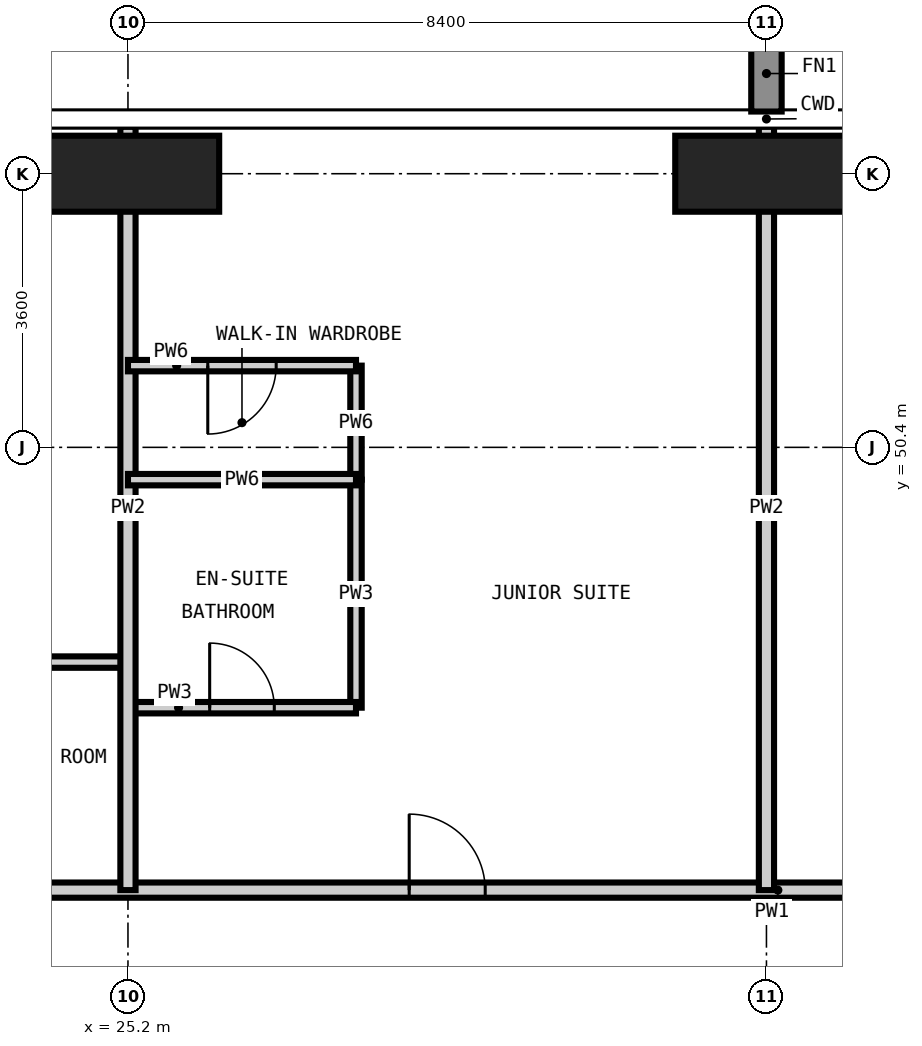
"""IFC4 building model, lengths in metres.
Left out: names, types, materials, properties, quantities, classifications, styles, units other than length and angle.
Written with IfcOpenShell. Run it as: python <this file> out.ifc"""

import sys

from ifc_helpers import new_model, si_unit, direction, frame, frame_2d, origin, origin_2d, place, context, subcontext, project, spatial, rectangle, extrude, element, fill, save


model = new_model("IFC4")
c1 = context("Model", 3, precision=1e-05, world=origin(), true_north=direction((0.0, 1.0)))
c2 = subcontext(c1, "Body", "Model", "MODEL_VIEW")
j1 = project(units=[si_unit("LENGTHUNIT", "METRE"), si_unit("PLANEANGLEUNIT", "RADIAN")], contexts=[c1])
p1 = place(None, origin())
s1 = spatial("IfcSite", under=j1, at=p1, CompositionType="ELEMENT")
p2 = place(p1, origin())
s2 = spatial("IfcBuilding", under=s1, at=p2, CompositionType="ELEMENT")
p3 = place(p2, frame((0.0, 0.0, 237.3)))
s3 = spatial("IfcBuildingStorey", under=s2, at=p3, CompositionType="ELEMENT", Elevation=237.3)
for number, where, z_axis, x_axis in (
    (1, (25.2, 54.0, -0.35), (0.0, 0.0, 1.0), (1.0, 0.0, 0.0)),
    (2, (33.6, 54.0, -0.35), (0.0, 0.0, 1.0), (1.0, 0.0, 0.0)),
):
    element("IfcColumn", number, at=place(p3, frame(where, z_axis=z_axis, x_axis=x_axis)), inside=s3, PredefinedType="COLUMN", context=c2, shape_type="SweptSolid", body=[
        extrude(rectangle(XDim=2.4, YDim=1.0, at=origin_2d()), origin(), (0.0, 0.0, 1.0), 3.9),
    ])
p4 = place(p3, frame((28.2, 46.975, 0.0), z_axis=(0.0, 0.0, 1.0), x_axis=(0.0, 1.0, 0.0)))
e3 = element("IfcWall", 3, at=p4, inside=s3, PredefinedType="PARTITIONING", context=c2, shape_type="SweptSolid", body=[
    extrude(rectangle(XDim=3.0, YDim=0.15, at=frame_2d((1.5, 0.0))), origin(), (0.0, 0.0, 1.0), 3.55),
])
p5 = place(p3, frame((25.2, 46.975, 0.0), z_axis=(0.0, 0.0, 1.0), x_axis=(1.0, 0.0, 0.0)))
e4 = element("IfcWall", 4, at=p5, inside=s3, PredefinedType="PARTITIONING", context=c2, shape_type="SweptSolid", body=[
    extrude(rectangle(XDim=3.0, YDim=0.15, at=frame_2d((1.5, 0.0))), origin(), (0.0, 0.0, 1.0), 3.55),
])
p6 = place(p5, frame((1.075, 0.0, 0.0)))
e5 = element("IfcOpeningElement", 5, at=p6, cuts=e4, PredefinedType="OPENING", context=c2, shape_type="SweptSolid", body=[
    extrude(rectangle(XDim=0.85, YDim=2.1, at=frame_2d((0.425, 1.05))), frame((0.0, 0.085, 0.0), z_axis=(0.0, -1.0, 0.0), x_axis=(1.0, 0.0, 0.0)), (0.0, 0.0, 1.0), 0.17),
])
p7 = place(p3, frame((22.325, 47.575, 0.0), z_axis=(0.0, 0.0, 1.0), x_axis=(1.0, 0.0, 0.0)))
e6 = element("IfcWall", 6, at=p7, inside=s3, PredefinedType="PARTITIONING", context=c2, shape_type="SweptSolid", body=[
    extrude(rectangle(XDim=2.875, YDim=0.15, at=frame_2d((1.438, 0.0))), origin(), (0.0, 0.0, 1.0), 3.55),
])
p8 = place(p3, frame((22.325, 44.575, 0.0), z_axis=(0.0, 0.0, 1.0), x_axis=(1.0, 0.0, 0.0)))
e7 = element("IfcWall", 7, at=p8, inside=s3, PredefinedType="PARTITIONING", context=c2, shape_type="SweptSolid", body=[
    extrude(rectangle(XDim=22.85, YDim=0.2, at=frame_2d((11.425, 0.0))), origin(), (0.0, 0.0, 1.0), 3.55),
])
p9 = place(p8, frame((6.575, 0.0, 0.0)))
e8 = element("IfcOpeningElement", 8, at=p9, cuts=e7, PredefinedType="OPENING", context=c2, shape_type="SweptSolid", body=[
    extrude(rectangle(XDim=1.0, YDim=2.2, at=frame_2d((0.5, 1.1))), frame((0.0, 0.11, 0.0), z_axis=(0.0, -1.0, 0.0), x_axis=(1.0, 0.0, 0.0)), (0.0, 0.0, 1.0), 0.22),
])
p10 = place(p8, frame((14.975, 0.0, 0.0)))
e9 = element("IfcOpeningElement", 9, at=p10, cuts=e7, PredefinedType="OPENING", context=c2, shape_type="SweptSolid", body=[
    extrude(rectangle(XDim=1.0, YDim=2.2, at=frame_2d((0.5, 1.1))), frame((0.0, 0.11, 0.0), z_axis=(0.0, -1.0, 0.0), x_axis=(1.0, 0.0, 0.0)), (0.0, 0.0, 1.0), 0.22),
])
for number, where, z_axis, x_axis in (
    (10, (25.2, 44.575, 0.0), (0.0, 0.0, 1.0), (0.0, 1.0, 0.0)),
    (11, (33.6, 44.575, 0.0), (0.0, 0.0, 1.0), (0.0, 1.0, 0.0)),
):
    element("IfcWall", number, at=place(p3, frame(where, z_axis=z_axis, x_axis=x_axis)), inside=s3, PredefinedType="PARTITIONING", context=c2, shape_type="SweptSolid", body=[
        extrude(rectangle(XDim=10.043, YDim=0.2, at=frame_2d((5.021, 0.0))), origin(), (0.0, 0.0, 1.0), 3.55),
    ])
p11 = place(p3, frame((28.2, 49.975, 0.0), z_axis=(0.0, 0.0, 1.0), x_axis=(0.0, 1.0, 0.0)))
e12 = element("IfcWall", 12, at=p11, inside=s3, PredefinedType="PARTITIONING", context=c2, shape_type="SweptSolid", body=[
    extrude(rectangle(XDim=1.5, YDim=0.15, at=frame_2d((0.75, 0.0))), origin(), (0.0, 0.0, 1.0), 3.55),
])
p12 = place(p3, frame((25.2, 49.975, 0.0), z_axis=(0.0, 0.0, 1.0), x_axis=(1.0, 0.0, 0.0)))
e13 = element("IfcWall", 13, at=p12, inside=s3, PredefinedType="PARTITIONING", context=c2, shape_type="SweptSolid", body=[
    extrude(rectangle(XDim=3.0, YDim=0.15, at=frame_2d((1.5, 0.0))), origin(), (0.0, 0.0, 1.0), 3.55),
])
p13 = place(p3, frame((25.2, 51.475, 0.0), z_axis=(0.0, 0.0, 1.0), x_axis=(1.0, 0.0, 0.0)))
e14 = element("IfcWall", 14, at=p13, inside=s3, PredefinedType="PARTITIONING", context=c2, shape_type="SweptSolid", body=[
    extrude(rectangle(XDim=3.0, YDim=0.15, at=frame_2d((1.5, 0.0))), origin(), (0.0, 0.0, 1.0), 3.55),
])
p14 = place(p13, frame((1.05, 0.0, 0.0)))
e15 = element("IfcOpeningElement", 15, at=p14, cuts=e14, PredefinedType="OPENING", context=c2, shape_type="SweptSolid", body=[
    extrude(rectangle(XDim=0.9, YDim=2.1, at=frame_2d((0.45, 1.05))), frame((0.0, 0.085, 0.0), z_axis=(0.0, -1.0, 0.0), x_axis=(1.0, 0.0, 0.0)), (0.0, 0.0, 1.0), 0.17),
])
p15 = place(p9, origin())
e16 = element("IfcDoor", 16, at=p15, inside=s3, OperationType="SINGLE_SWING_LEFT", PredefinedType="DOOR", context=c2, shape_type="SweptSolid", body=[
    extrude(rectangle(XDim=1.0, YDim=2.2, at=frame_2d((0.5, 1.1))), frame((0.0, 0.025, 0.0), z_axis=(0.0, -1.0, 0.0), x_axis=(1.0, 0.0, 0.0)), (0.0, 0.0, 1.0), 0.05),
])
fill(e8, e16)
p16 = place(p6, origin())
e17 = element("IfcDoor", 17, at=p16, inside=s3, OperationType="SINGLE_SWING_LEFT", PredefinedType="DOOR", context=c2, shape_type="SweptSolid", body=[
    extrude(rectangle(XDim=0.85, YDim=2.1, at=frame_2d((0.425, 1.05))), frame((0.0, 0.025, 0.0), z_axis=(0.0, -1.0, 0.0), x_axis=(1.0, 0.0, 0.0)), (0.0, 0.0, 1.0), 0.05),
])
fill(e5, e17)
p17 = place(p14, frame((0.9, 0.0, 0.0), z_axis=(0.0, 0.0, 1.0), x_axis=(-1.0, 0.0, 0.0)))
e18 = element("IfcDoor", 18, at=p17, inside=s3, OperationType="SINGLE_SWING_RIGHT", PredefinedType="DOOR", context=c2, shape_type="SweptSolid", body=[
    extrude(rectangle(XDim=0.9, YDim=2.1, at=frame_2d((0.45, 1.05))), frame((0.0, 0.025, 0.0), z_axis=(0.0, -1.0, 0.0), x_axis=(1.0, 0.0, 0.0)), (0.0, 0.0, 1.0), 0.05),
])
fill(e15, e18)
save(model, sys.argv[1])
